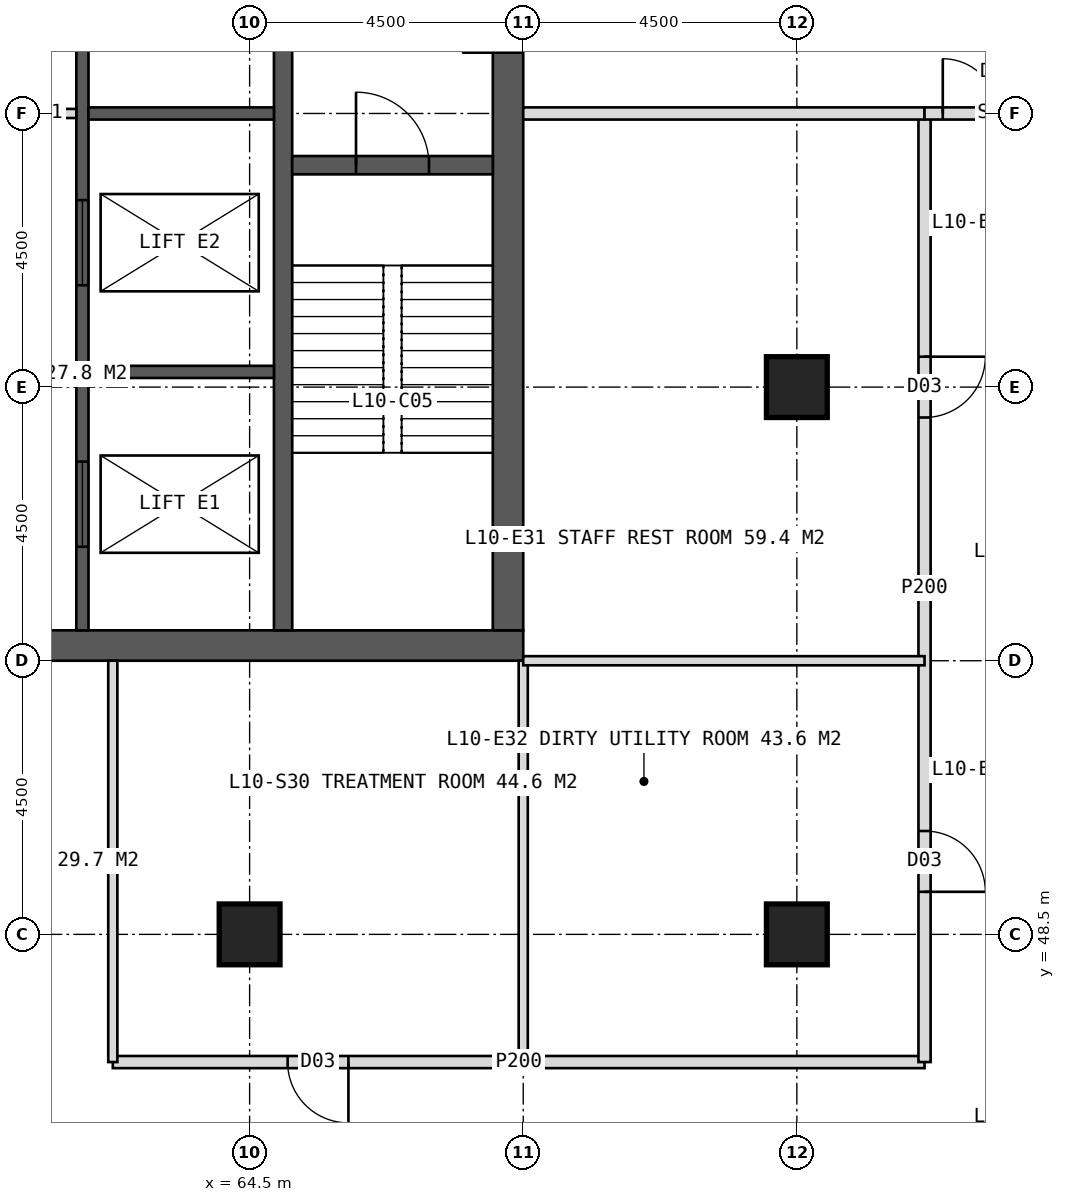
"""IFC4 building model, lengths in metres.
Left out: names, types, materials, properties, quantities, classifications, styles, units other than length and angle.
Written with IfcOpenShell. Run it as: python <this file> out.ifc"""

import sys

from ifc_helpers import new_model, si_unit, direction, frame, frame_2d, origin, origin_2d, place, context, subcontext, project, spatial, rectangle, hollow_rectangle, extrude, element, fill, save


model = new_model("IFC4")
c1 = context("Model", 3, precision=1e-05, world=origin(), true_north=direction((0.0, 1.0)))
c2 = subcontext(c1, "Body", "Model", "MODEL_VIEW")
j1 = project(units=[si_unit("LENGTHUNIT", "METRE"), si_unit("PLANEANGLEUNIT", "RADIAN")], contexts=[c1])
p1 = place(None, origin())
s1 = spatial("IfcSite", under=j1, at=p1, CompositionType="ELEMENT")
p2 = place(p1, origin())
s2 = spatial("IfcBuilding", under=s1, at=p2, CompositionType="ELEMENT")
p3 = place(p2, frame((0.0, 0.0, 47.0)))
s3 = spatial("IfcBuildingStorey", under=s2, at=p3, CompositionType="ELEMENT", Elevation=47.0)
p4 = place(p3, frame((51.0, 53.25, 0.0), z_axis=(0.0, 0.0, 1.0), x_axis=(1.0, 0.0, 0.0)))
e1 = element("IfcWall", 1, at=p4, inside=s3, PredefinedType="SHEAR", context=c2, shape_type="SweptSolid", body=[
    extrude(rectangle(XDim=18.0, YDim=0.5, at=frame_2d((9.0, 0.0))), origin(), (0.0, 0.0, 1.0), 4.0),
])
p5 = place(p4, frame((8.1, 0.0, 0.0)))
e2 = element("IfcOpeningElement", 2, at=p5, cuts=e1, PredefinedType="OPENING", context=c2, shape_type="SweptSolid", body=[
    extrude(rectangle(XDim=1.8, YDim=2.2, at=frame_2d((0.9, 1.1))), frame((0.0, 0.26, 0.0), z_axis=(0.0, -1.0, 0.0), x_axis=(1.0, 0.0, 0.0)), (0.0, 0.0, 1.0), 0.52),
])
p6 = place(p3, frame((68.75, 53.5, 0.0), z_axis=(0.0, 0.0, 1.0), x_axis=(0.0, 1.0, 0.0)))
e3 = element("IfcWall", 3, at=p6, inside=s3, PredefinedType="SHEAR", context=c2, shape_type="SweptSolid", body=[
    extrude(rectangle(XDim=17.0, YDim=0.5, at=frame_2d((8.5, 0.0))), origin(), (0.0, 0.0, 1.0), 4.0),
])
p7 = place(p6, frame((9.5, 0.0, 0.0)))
e4 = element("IfcOpeningElement", 4, at=p7, cuts=e3, PredefinedType="OPENING", context=c2, shape_type="SweptSolid", body=[
    extrude(rectangle(XDim=1.5, YDim=2.2, at=frame_2d((0.75, 1.1))), frame((0.0, 0.26, 0.0), z_axis=(0.0, -1.0, 0.0), x_axis=(1.0, 0.0, 0.0)), (0.0, 0.0, 1.0), 0.52),
])
p8 = place(p3, frame((65.05, 53.5, 0.0), z_axis=(0.0, 0.0, 1.0), x_axis=(0.0, 1.0, 0.0)))
e5 = element("IfcWall", 5, at=p8, inside=s3, PredefinedType="SHEAR", context=c2, shape_type="SweptSolid", body=[
    extrude(rectangle(XDim=17.0, YDim=0.3, at=frame_2d((8.5, 0.0))), origin(), (0.0, 0.0, 1.0), 4.0),
])
p9 = place(p3, frame((61.75, 53.5, 0.0), z_axis=(0.0, 0.0, 1.0), x_axis=(0.0, 1.0, 0.0)))
e6 = element("IfcWall", 6, at=p9, inside=s3, PredefinedType="SHEAR", context=c2, shape_type="SweptSolid", body=[
    extrude(rectangle(XDim=17.0, YDim=0.2, at=frame_2d((8.5, 0.0))), origin(), (0.0, 0.0, 1.0), 4.0),
])
p10 = place(p9, frame((1.375, 0.0, 0.0)))
e7 = element("IfcOpeningElement", 7, at=p10, cuts=e6, PredefinedType="OPENING", context=c2, shape_type="SweptSolid", body=[
    extrude(rectangle(XDim=1.4, YDim=2.2, at=frame_2d((0.7, 1.1))), frame((0.0, 0.11, 0.0), z_axis=(0.0, -1.0, 0.0), x_axis=(1.0, 0.0, 0.0)), (0.0, 0.0, 1.0), 0.22),
])
p11 = place(p9, frame((5.675, 0.0, 0.0)))
e8 = element("IfcOpeningElement", 8, at=p11, cuts=e6, PredefinedType="OPENING", context=c2, shape_type="SweptSolid", body=[
    extrude(rectangle(XDim=1.4, YDim=2.2, at=frame_2d((0.7, 1.1))), frame((0.0, 0.11, 0.0), z_axis=(0.0, -1.0, 0.0), x_axis=(1.0, 0.0, 0.0)), (0.0, 0.0, 1.0), 0.22),
])
for number, where, z_axis, x_axis in (
    (9, (61.85, 57.75, 0.0), (0.0, 0.0, 1.0), (1.0, 0.0, 0.0)),
    (10, (61.85, 62.0, 0.0), (0.0, 0.0, 1.0), (1.0, 0.0, 0.0)),
):
    element("IfcWall", number, at=place(p3, frame(where, z_axis=z_axis, x_axis=x_axis)), inside=s3, PredefinedType="SHEAR", context=c2, shape_type="SweptSolid", body=[
        extrude(rectangle(XDim=3.05, YDim=0.2, at=frame_2d((1.525, 0.0))), origin(), (0.0, 0.0, 1.0), 4.0),
    ])
p12 = place(p3, frame((65.2, 61.15, 0.0), z_axis=(0.0, 0.0, 1.0), x_axis=(1.0, 0.0, 0.0)))
e11 = element("IfcWall", 11, at=p12, inside=s3, PredefinedType="SHEAR", context=c2, shape_type="SweptSolid", body=[
    extrude(rectangle(XDim=3.3, YDim=0.3, at=frame_2d((1.65, 0.0))), origin(), (0.0, 0.0, 1.0), 4.0),
])
p13 = place(p12, frame((1.05, 0.0, 0.0)))
e12 = element("IfcOpeningElement", 12, at=p13, cuts=e11, PredefinedType="OPENING", context=c2, shape_type="SweptSolid", body=[
    extrude(rectangle(XDim=1.2, YDim=2.1, at=frame_2d((0.6, 1.05))), frame((0.0, 0.16, 0.0), z_axis=(0.0, -1.0, 0.0), x_axis=(1.0, 0.0, 0.0)), (0.0, 0.0, 1.0), 0.32),
])
for number, where, z_axis, x_axis in (
    (13, (73.5, 48.5, 0.0), (0.0, 0.0, 1.0), (1.0, 0.0, 0.0)),
    (14, (64.5, 48.5, 0.0), (0.0, 0.0, 1.0), (1.0, 0.0, 0.0)),
    (15, (73.5, 57.5, 0.0), (0.0, 0.0, 1.0), (1.0, 0.0, 0.0)),
):
    element("IfcColumn", number, at=place(p3, frame(where, z_axis=z_axis, x_axis=x_axis)), inside=s3, PredefinedType="COLUMN", context=c2, shape_type="SweptSolid", body=[
        extrude(hollow_rectangle(XDim=1.0, YDim=1.0, WallThickness=0.1, at=origin_2d()), origin(), (0.0, 0.0, 1.0), 4.0),
    ])
p14 = place(p3, frame((69.0, 53.0, 0.0), z_axis=(0.0, 0.0, 1.0), x_axis=(0.0, -1.0, 0.0)))
e16 = element("IfcWall", 16, at=p14, inside=s3, PredefinedType="PARTITIONING", context=c2, shape_type="SweptSolid", body=[
    extrude(rectangle(XDim=6.6, YDim=0.15, at=frame_2d((3.3, 0.0))), origin(), (0.0, 0.0, 1.0), 3.75),
])
p15 = place(p3, frame((75.6, 46.4, 0.0), z_axis=(0.0, 0.0, 1.0), x_axis=(-1.0, 0.0, 0.0)))
e17 = element("IfcWall", 17, at=p15, inside=s3, PredefinedType="PARTITIONING", context=c2, shape_type="SweptSolid", body=[
    extrude(rectangle(XDim=13.35, YDim=0.2, at=frame_2d((6.675, 0.0))), origin(), (0.0, 0.0, 1.0), 3.75),
])
p16 = place(p15, frame((9.475, 0.0, 0.0)))
e18 = element("IfcOpeningElement", 18, at=p16, cuts=e17, PredefinedType="OPENING", context=c2, shape_type="SweptSolid", body=[
    extrude(rectangle(XDim=1.0, YDim=2.1, at=frame_2d((0.5, 1.05))), frame((0.0, 0.11, 0.0), z_axis=(0.0, -1.0, 0.0), x_axis=(1.0, 0.0, 0.0)), (0.0, 0.0, 1.0), 0.22),
])
p17 = place(p3, frame((62.25, 53.0, 0.0), z_axis=(0.0, 0.0, 1.0), x_axis=(0.0, -1.0, 0.0)))
e19 = element("IfcWall", 19, at=p17, inside=s3, PredefinedType="PARTITIONING", context=c2, shape_type="SweptSolid", body=[
    extrude(rectangle(XDim=6.6, YDim=0.15, at=frame_2d((3.3, 0.0))), origin(), (0.0, 0.0, 1.0), 3.75),
])
p18 = place(p3, frame((75.6, 62.0, 0.0), z_axis=(0.0, 0.0, 1.0), x_axis=(0.0, -1.0, 0.0)))
e20 = element("IfcWall", 20, at=p18, inside=s3, PredefinedType="PARTITIONING", context=c2, shape_type="SweptSolid", body=[
    extrude(rectangle(XDim=15.6, YDim=0.2, at=frame_2d((7.8, 0.0))), origin(), (0.0, 0.0, 1.0), 3.75),
])
p19 = place(p18, frame((4.0, 0.0, 0.0)))
e21 = element("IfcOpeningElement", 21, at=p19, cuts=e20, PredefinedType="OPENING", context=c2, shape_type="SweptSolid", body=[
    extrude(rectangle(XDim=1.0, YDim=2.1, at=frame_2d((0.5, 1.05))), frame((0.0, 0.11, 0.0), z_axis=(0.0, -1.0, 0.0), x_axis=(1.0, 0.0, 0.0)), (0.0, 0.0, 1.0), 0.22),
])
p20 = place(p18, frame((11.8, 0.0, 0.0)))
e22 = element("IfcOpeningElement", 22, at=p20, cuts=e20, PredefinedType="OPENING", context=c2, shape_type="SweptSolid", body=[
    extrude(rectangle(XDim=1.0, YDim=2.1, at=frame_2d((0.5, 1.05))), frame((0.0, 0.11, 0.0), z_axis=(0.0, -1.0, 0.0), x_axis=(1.0, 0.0, 0.0)), (0.0, 0.0, 1.0), 0.22),
])
p21 = place(p3, frame((69.0, 62.0, 0.0), z_axis=(0.0, 0.0, 1.0), x_axis=(1.0, 0.0, 0.0)))
e23 = element("IfcWall", 23, at=p21, inside=s3, PredefinedType="SOLIDWALL", context=c2, shape_type="SweptSolid", body=[
    extrude(rectangle(XDim=6.6, YDim=0.2, at=frame_2d((3.3, 0.0))), origin(), (0.0, 0.0, 1.0), 2.75),
])
p22 = place(p3, frame((69.0, 53.0, 0.0), z_axis=(0.0, 0.0, 1.0), x_axis=(1.0, 0.0, 0.0)))
e24 = element("IfcWall", 24, at=p22, inside=s3, PredefinedType="PARTITIONING", context=c2, shape_type="SweptSolid", body=[
    extrude(rectangle(XDim=6.6, YDim=0.15, at=frame_2d((3.3, 0.0))), origin(), (0.0, 0.0, 1.0), 3.75),
])
p23 = place(p3, frame((75.6, 62.0, 0.0), z_axis=(0.0, 0.0, 1.0), x_axis=(1.0, 0.0, 0.0)))
e25 = element("IfcWall", 25, at=p23, inside=s3, PredefinedType="SOLIDWALL", context=c2, shape_type="SweptSolid", body=[
    extrude(rectangle(XDim=2.7, YDim=0.2, at=frame_2d((1.35, 0.0))), origin(), (0.0, 0.0, 1.0), 2.75),
])
p24 = place(p23, frame((0.3, 0.0, 0.0)))
e26 = element("IfcOpeningElement", 26, at=p24, cuts=e25, PredefinedType="OPENING", context=c2, shape_type="SweptSolid", body=[
    extrude(rectangle(XDim=1.8, YDim=2.2, at=frame_2d((0.9, 1.1))), frame((0.0, 0.11, 0.0), z_axis=(0.0, -1.0, 0.0), x_axis=(1.0, 0.0, 0.0)), (0.0, 0.0, 1.0), 0.22),
])
p25 = place(p3, frame((58.35, 62.0, 0.0), z_axis=(0.0, 0.0, 1.0), x_axis=(1.0, 0.0, 0.0)))
e27 = element("IfcWall", 27, at=p25, inside=s3, PredefinedType="PARTITIONING", context=c2, shape_type="SweptSolid", body=[
    extrude(rectangle(XDim=3.3, YDim=0.15, at=frame_2d((1.65, 0.0))), origin(), (0.0, 0.0, 1.0), 3.75),
])
p26 = place(p25, frame((1.15, 0.0, 0.0)))
e28 = element("IfcOpeningElement", 28, at=p26, cuts=e27, PredefinedType="OPENING", context=c2, shape_type="SweptSolid", body=[
    extrude(rectangle(XDim=1.0, YDim=2.1, at=frame_2d((0.5, 1.05))), frame((0.0, 0.085, 0.0), z_axis=(0.0, -1.0, 0.0), x_axis=(1.0, 0.0, 0.0)), (0.0, 0.0, 1.0), 0.17),
])
p27 = place(p16, origin())
e29 = element("IfcDoor", 29, at=p27, inside=s3, OperationType="SINGLE_SWING_LEFT", PredefinedType="DOOR", context=c2, shape_type="SweptSolid", body=[
    extrude(rectangle(XDim=1.0, YDim=2.1, at=frame_2d((0.5, 1.05))), frame((0.0, 0.025, 0.0), z_axis=(0.0, -1.0, 0.0), x_axis=(1.0, 0.0, 0.0)), (0.0, 0.0, 1.0), 0.05),
])
fill(e18, e29)
p28 = place(p19, origin())
e30 = element("IfcDoor", 30, at=p28, inside=s3, OperationType="SINGLE_SWING_LEFT", PredefinedType="DOOR", context=c2, shape_type="SweptSolid", body=[
    extrude(rectangle(XDim=1.0, YDim=2.1, at=frame_2d((0.5, 1.05))), frame((0.0, 0.025, 0.0), z_axis=(0.0, -1.0, 0.0), x_axis=(1.0, 0.0, 0.0)), (0.0, 0.0, 1.0), 0.05),
])
fill(e21, e30)
p29 = place(p20, origin())
e31 = element("IfcDoor", 31, at=p29, inside=s3, OperationType="SINGLE_SWING_RIGHT", PredefinedType="DOOR", context=c2, shape_type="SweptSolid", body=[
    extrude(rectangle(XDim=1.0, YDim=2.1, at=frame_2d((0.5, 1.05))), frame((0.0, 0.025, 0.0), z_axis=(0.0, -1.0, 0.0), x_axis=(1.0, 0.0, 0.0)), (0.0, 0.0, 1.0), 0.05),
])
fill(e22, e31)
p30 = place(p24, origin())
e32 = element("IfcDoor", 32, at=p30, inside=s3, OperationType="DOUBLE_DOOR_DOUBLE_SWING", PredefinedType="DOOR", context=c2, shape_type="SweptSolid", body=[
    extrude(rectangle(XDim=1.8, YDim=2.2, at=frame_2d((0.9, 1.1))), frame((0.0, 0.025, 0.0), z_axis=(0.0, -1.0, 0.0), x_axis=(1.0, 0.0, 0.0)), (0.0, 0.0, 1.0), 0.05),
])
fill(e26, e32)
p31 = place(p13, origin())
e33 = element("IfcDoor", 33, at=p31, inside=s3, OperationType="SINGLE_SWING_LEFT", PredefinedType="DOOR", context=c2, shape_type="SweptSolid", body=[
    extrude(rectangle(XDim=1.2, YDim=2.1, at=frame_2d((0.6, 1.05))), frame((0.0, 0.025, 0.0), z_axis=(0.0, -1.0, 0.0), x_axis=(1.0, 0.0, 0.0)), (0.0, 0.0, 1.0), 0.05),
])
fill(e12, e33)
p32 = place(p10, origin())
e34 = element("IfcDoor", 34, at=p32, inside=s3, OperationType="SLIDING_TO_LEFT", PredefinedType="DOOR", context=c2, shape_type="SweptSolid", body=[
    extrude(rectangle(XDim=1.4, YDim=2.2, at=frame_2d((0.7, 1.1))), frame((0.0, 0.025, 0.0), z_axis=(0.0, -1.0, 0.0), x_axis=(1.0, 0.0, 0.0)), (0.0, 0.0, 1.0), 0.05),
])
fill(e7, e34)
p33 = place(p11, origin())
e35 = element("IfcDoor", 35, at=p33, inside=s3, OperationType="SLIDING_TO_LEFT", PredefinedType="DOOR", context=c2, shape_type="SweptSolid", body=[
    extrude(rectangle(XDim=1.4, YDim=2.2, at=frame_2d((0.7, 1.1))), frame((0.0, 0.025, 0.0), z_axis=(0.0, -1.0, 0.0), x_axis=(1.0, 0.0, 0.0)), (0.0, 0.0, 1.0), 0.05),
])
fill(e8, e35)
save(model, sys.argv[1])
